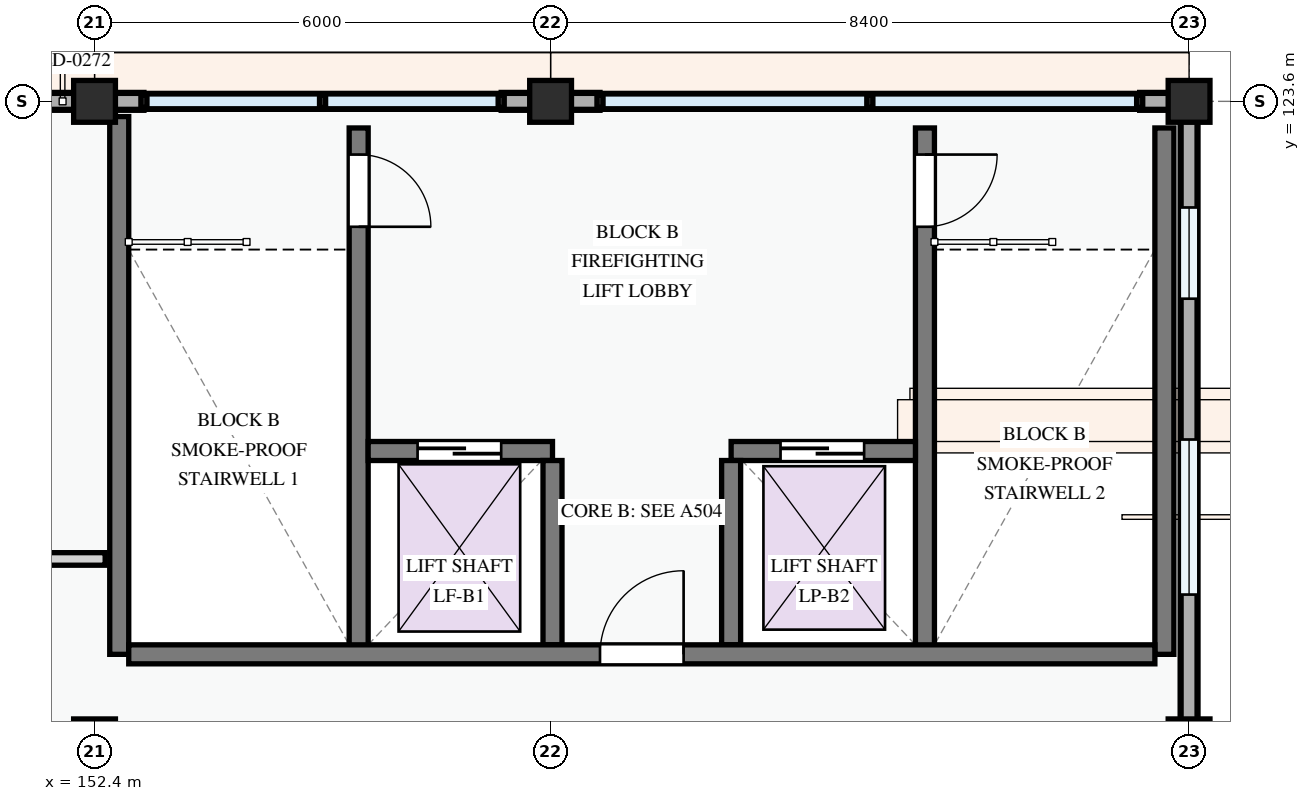
"""IFC4 building model, lengths in metres.
Left out: names, types, materials, properties, quantities, classifications, styles, units other than length and angle.
Written with IfcOpenShell. Run it as: python <this file> out.ifc"""

import sys

from ifc_helpers import new_model, si_unit, direction, frame, frame_2d, origin, origin_2d, place, context, subcontext, project, spatial, polyline, rectangle, outline, extrude, element, fill, save


model = new_model("IFC4")
c1 = context("Model", 3, precision=1e-05, world=origin(), true_north=direction((0.0, 1.0)))
c2 = subcontext(c1, "Body", "Model", "MODEL_VIEW")
j1 = project(units=[si_unit("LENGTHUNIT", "METRE"), si_unit("PLANEANGLEUNIT", "RADIAN")], contexts=[c1])
p1 = place(None, origin())
s1 = spatial("IfcSite", under=j1, at=p1, CompositionType="ELEMENT")
p2 = place(p1, origin())
s2 = spatial("IfcBuilding", under=s1, at=p2, CompositionType="ELEMENT")
p3 = place(p2, frame((0.0, 0.0, 41.1)))
s3 = spatial("IfcBuildingStorey", under=s2, at=p3, CompositionType="ELEMENT", Elevation=41.1)
for number, where, z_axis, x_axis in (
    (1, (152.4, 115.2, 0.0), (0.0, 0.0, 1.0), (1.0, 0.0, 0.0)),
    (2, (152.4, 123.6, 0.0), (0.0, 0.0, 1.0), (1.0, 0.0, 0.0)),
    (3, (158.4, 123.6, 0.0), (0.0, 0.0, 1.0), (1.0, 0.0, 0.0)),
    (4, (166.8, 115.2, 0.0), (0.0, 0.0, 1.0), (1.0, 0.0, 0.0)),
    (5, (166.8, 123.6, 0.0), (0.0, 0.0, 1.0), (1.0, 0.0, 0.0)),
):
    element("IfcColumn", number, at=place(p3, frame(where, z_axis=z_axis, x_axis=x_axis)), inside=s3, PredefinedType="COLUMN", context=c2, shape_type="SweptSolid", body=[
        extrude(rectangle(XDim=0.55, YDim=0.55, at=origin_2d()), origin(), (0.0, 0.0, 1.0), 3.3),
    ])
p4 = place(p3, frame((166.8, 115.2, 0.0), z_axis=(0.0, 0.0, 1.0), x_axis=(0.0, 1.0, 0.0)))
e6 = element("IfcWall", 6, at=p4, inside=s3, PredefinedType="STANDARD", context=c2, shape_type="SweptSolid", body=[
    extrude(rectangle(XDim=8.4, YDim=0.235, at=frame_2d((4.2, 0.0))), origin(), (0.0, 0.0, 1.0), 2.345),
])
p5 = place(p4, frame((1.911, 0.0, 0.78)))
e7 = element("IfcOpeningElement", 7, at=p5, cuts=e6, PredefinedType="OPENING", context=c2, shape_type="SweptSolid", body=[
    extrude(rectangle(XDim=2.04, YDim=1.46, at=frame_2d((1.02, 0.73))), frame((0.0, 0.127, 0.0), z_axis=(0.0, -1.0, 0.0), x_axis=(1.0, 0.0, 0.0)), (0.0, 0.0, 1.0), 0.255),
])
p6 = place(p4, frame((5.804, 0.0, 0.78)))
e8 = element("IfcOpeningElement", 8, at=p6, cuts=e6, PredefinedType="OPENING", context=c2, shape_type="SweptSolid", body=[
    extrude(rectangle(XDim=1.2, YDim=1.35, at=frame_2d((0.6, 0.675))), frame((0.0, 0.127, 0.0), z_axis=(0.0, -1.0, 0.0), x_axis=(1.0, 0.0, 0.0)), (0.0, 0.0, 1.0), 0.255),
])
p7 = place(p3, frame((166.68, 123.6, 0.0), z_axis=(0.0, 0.0, 1.0), x_axis=(-1.0, 0.0, 0.0)))
e9 = element("IfcWall", 9, at=p7, inside=s3, PredefinedType="STANDARD", context=c2, shape_type="SweptSolid", body=[
    extrude(rectangle(XDim=0.531, YDim=0.235, at=frame_2d((0.265, 0.0))), origin(), (0.0, 0.0, 1.0), 3.04),
])
p8 = place(p3, frame((159.05, 123.6, 0.0), z_axis=(0.0, 0.0, 1.0), x_axis=(-1.0, 0.0, 0.0)))
e10 = element("IfcWall", 10, at=p8, inside=s3, PredefinedType="STANDARD", context=c2, shape_type="SweptSolid", body=[
    extrude(rectangle(XDim=0.65, YDim=0.235, at=frame_2d((0.325, 0.0))), origin(), (0.0, 0.0, 1.0), 3.04),
])
p9 = place(p3, frame((158.4, 123.6, 0.0), z_axis=(0.0, 0.0, 1.0), x_axis=(-1.0, 0.0, 0.0)))
e11 = element("IfcWall", 11, at=p9, inside=s3, PredefinedType="STANDARD", context=c2, shape_type="SweptSolid", body=[
    extrude(rectangle(XDim=0.65, YDim=0.235, at=frame_2d((0.325, 0.0))), origin(), (0.0, 0.0, 1.0), 3.04),
])
p10 = place(p3, frame((153.05, 123.6, 0.0), z_axis=(0.0, 0.0, 1.0), x_axis=(-1.0, 0.0, 0.0)))
e12 = element("IfcWall", 12, at=p10, inside=s3, PredefinedType="STANDARD", context=c2, shape_type="SweptSolid", body=[
    extrude(rectangle(XDim=0.65, YDim=0.235, at=frame_2d((0.325, 0.0))), origin(), (0.0, 0.0, 1.0), 3.04),
])
p11 = place(p3, frame((152.4, 123.6, 0.0), z_axis=(0.0, 0.0, 1.0), x_axis=(-1.0, 0.0, 0.0)))
e13 = element("IfcWall", 13, at=p11, inside=s3, PredefinedType="STANDARD", context=c2, shape_type="SweptSolid", body=[
    extrude(rectangle(XDim=8.4, YDim=0.235, at=frame_2d((4.2, 0.0))), origin(), (0.0, 0.0, 1.0), 2.345),
])
p12 = place(p11, frame((0.62, 0.0, 0.0)))
e14 = element("IfcOpeningElement", 14, at=p12, cuts=e13, PredefinedType="OPENING", context=c2, shape_type="SweptSolid", body=[
    extrude(rectangle(XDim=1.3, YDim=2.15, at=frame_2d((0.65, 1.075))), frame((0.0, 0.127, 0.0), z_axis=(0.0, -1.0, 0.0), x_axis=(1.0, 0.0, 0.0)), (0.0, 0.0, 1.0), 0.255),
])
p13 = place(p11, frame((2.79, 0.0, 0.78)))
e15 = element("IfcOpeningElement", 15, at=p13, cuts=e13, PredefinedType="OPENING", context=c2, shape_type="SweptSolid", body=[
    extrude(rectangle(XDim=1.55, YDim=1.4, at=frame_2d((0.775, 0.7))), frame((0.0, 0.127, 0.0), z_axis=(0.0, -1.0, 0.0), x_axis=(1.0, 0.0, 0.0)), (0.0, 0.0, 1.0), 0.255),
])
p14 = place(p11, frame((5.955, 0.0, 0.78)))
e16 = element("IfcOpeningElement", 16, at=p14, cuts=e13, PredefinedType="OPENING", context=c2, shape_type="SweptSolid", body=[
    extrude(rectangle(XDim=1.32, YDim=1.35, at=frame_2d((0.66, 0.675))), frame((0.0, 0.127, 0.0), z_axis=(0.0, -1.0, 0.0), x_axis=(1.0, 0.0, 0.0)), (0.0, 0.0, 1.0), 0.255),
])
for number, where, z_axis, x_axis in (
    (17, (166.8, 115.2, 3.3), (0.0, 0.0, 1.0), (0.0, 1.0, 0.0)),
    (18, (166.8, 123.6, 3.3), (0.0, 0.0, 1.0), (-1.0, 0.0, 0.0)),
):
    element("IfcWall", number, at=place(p3, frame(where, z_axis=z_axis, x_axis=x_axis)), inside=s3, PredefinedType="PARAPET", context=c2, shape_type="SweptSolid", body=[
        extrude(outline(polyline([(0.0, 0.0), (8.4, 0.0), (8.4, 1.12), (7.7, 1.322), (7.0, 1.485), (6.3, 1.618), (5.6, 1.718), (4.9, 1.779), (4.2, 1.8), (3.5, 1.779), (2.8, 1.718), (2.1, 1.618), (1.4, 1.485), (0.7, 1.322), (0.0, 1.12), (0.0, 0.0)])), frame((0.0, 0.105, 0.0), z_axis=(0.0, -1.0, 0.0), x_axis=(1.0, 0.0, 0.0)), (0.0, 0.0, 1.0), 0.21),
    ])
p15 = place(p3, frame((158.4, 123.6, 3.3), z_axis=(0.0, 0.0, 1.0), x_axis=(-1.0, 0.0, 0.0)))
e19 = element("IfcWall", 19, at=p15, inside=s3, PredefinedType="PARAPET", context=c2, shape_type="SweptSolid", body=[
    extrude(outline(polyline([(0.0, 0.0), (6.0, 0.0), (6.0, 1.12), (5.5, 1.322), (5.0, 1.485), (4.5, 1.618), (4.0, 1.718), (3.5, 1.779), (3.0, 1.8), (2.5, 1.779), (2.0, 1.718), (1.5, 1.618), (1.0, 1.485), (0.5, 1.322), (0.0, 1.12), (0.0, 0.0)])), frame((0.0, 0.105, 0.0), z_axis=(0.0, -1.0, 0.0), x_axis=(1.0, 0.0, 0.0)), (0.0, 0.0, 1.0), 0.21),
])
p16 = place(p3, frame((152.4, 123.6, 3.3), z_axis=(0.0, 0.0, 1.0), x_axis=(-1.0, 0.0, 0.0)))
e20 = element("IfcWall", 20, at=p16, inside=s3, PredefinedType="PARAPET", context=c2, shape_type="SweptSolid", body=[
    extrude(outline(polyline([(0.0, 0.0), (8.4, 0.0), (8.4, 1.12), (7.7, 1.322), (7.0, 1.485), (6.3, 1.618), (5.6, 1.718), (4.9, 1.779), (4.2, 1.8), (3.5, 1.779), (2.8, 1.718), (2.1, 1.618), (1.4, 1.485), (0.7, 1.322), (0.0, 1.12), (0.0, 0.0)])), frame((0.0, 0.105, 0.0), z_axis=(0.0, -1.0, 0.0), x_axis=(1.0, 0.0, 0.0)), (0.0, 0.0, 1.0), 0.21),
])
p17 = place(p3, frame((155.875, 123.25, 0.0), z_axis=(0.0, 0.0, 1.0), x_axis=(0.0, -1.0, 0.0)))
e21 = element("IfcWall", 21, at=p17, inside=s3, PredefinedType="SHEAR", context=c2, shape_type="SweptSolid", body=[
    extrude(rectangle(XDim=6.925, YDim=0.25, at=frame_2d((3.462, 0.0))), origin(), (0.0, 0.0, 1.0), 3.0),
])
p18 = place(p17, frame((0.35, 0.0, 0.0)))
e22 = element("IfcOpeningElement", 22, at=p18, cuts=e21, PredefinedType="OPENING", context=c2, shape_type="SweptSolid", body=[
    extrude(rectangle(XDim=0.95, YDim=2.1, at=frame_2d((0.475, 1.05))), frame((0.0, 0.135, 0.0), z_axis=(0.0, -1.0, 0.0), x_axis=(1.0, 0.0, 0.0)), (0.0, 0.0, 1.0), 0.27),
])
p19 = place(p3, frame((152.725, 123.4, 0.0), z_axis=(0.0, 0.0, 1.0), x_axis=(0.0, -1.0, 0.0)))
e23 = element("IfcWall", 23, at=p19, inside=s3, PredefinedType="SHEAR", context=c2, shape_type="SweptSolid", body=[
    extrude(rectangle(XDim=7.075, YDim=0.25, at=frame_2d((3.538, 0.0))), origin(), (0.0, 0.0, 1.0), 3.0),
])
p20 = place(p3, frame((166.475, 123.25, 0.0), z_axis=(0.0, 0.0, 1.0), x_axis=(0.0, -1.0, 0.0)))
e24 = element("IfcWall", 24, at=p20, inside=s3, PredefinedType="SHEAR", context=c2, shape_type="SweptSolid", body=[
    extrude(rectangle(XDim=6.925, YDim=0.25, at=frame_2d((3.462, 0.0))), origin(), (0.0, 0.0, 1.0), 3.0),
])
p21 = place(p3, frame((163.325, 123.25, 0.0), z_axis=(0.0, 0.0, 1.0), x_axis=(0.0, -1.0, 0.0)))
e25 = element("IfcWall", 25, at=p21, inside=s3, PredefinedType="SHEAR", context=c2, shape_type="SweptSolid", body=[
    extrude(rectangle(XDim=6.925, YDim=0.25, at=frame_2d((3.462, 0.0))), origin(), (0.0, 0.0, 1.0), 3.0),
])
p22 = place(p21, frame((0.35, 0.0, 0.0)))
e26 = element("IfcOpeningElement", 26, at=p22, cuts=e25, PredefinedType="OPENING", context=c2, shape_type="SweptSolid", body=[
    extrude(rectangle(XDim=0.95, YDim=2.1, at=frame_2d((0.475, 1.05))), frame((0.0, 0.135, 0.0), z_axis=(0.0, -1.0, 0.0), x_axis=(1.0, 0.0, 0.0)), (0.0, 0.0, 1.0), 0.27),
])
p23 = place(p3, frame((156.0, 119.0, 0.0), z_axis=(0.0, 0.0, 1.0), x_axis=(1.0, 0.0, 0.0)))
e27 = element("IfcWall", 27, at=p23, inside=s3, PredefinedType="SHEAR", context=c2, shape_type="SweptSolid", body=[
    extrude(rectangle(XDim=2.425, YDim=0.25, at=frame_2d((1.212, 0.0))), origin(), (0.0, 0.0, 1.0), 3.0),
])
p24 = place(p23, frame((0.65, 0.0, 0.0)))
e28 = element("IfcOpeningElement", 28, at=p24, cuts=e27, PredefinedType="OPENING", context=c2, shape_type="SweptSolid", body=[
    extrude(rectangle(XDim=1.1, YDim=2.15, at=frame_2d((0.55, 1.075))), frame((0.0, 0.135, 0.0), z_axis=(0.0, -1.0, 0.0), x_axis=(1.0, 0.0, 0.0)), (0.0, 0.0, 1.0), 0.27),
])
p25 = place(p3, frame((160.775, 119.0, 0.0), z_axis=(0.0, 0.0, 1.0), x_axis=(1.0, 0.0, 0.0)))
e29 = element("IfcWall", 29, at=p25, inside=s3, PredefinedType="SHEAR", context=c2, shape_type="SweptSolid", body=[
    extrude(rectangle(XDim=2.425, YDim=0.25, at=frame_2d((1.212, 0.0))), origin(), (0.0, 0.0, 1.0), 3.0),
])
p26 = place(p25, frame((0.65, 0.0, 0.0)))
e30 = element("IfcOpeningElement", 30, at=p26, cuts=e29, PredefinedType="OPENING", context=c2, shape_type="SweptSolid", body=[
    extrude(rectangle(XDim=1.1, YDim=2.15, at=frame_2d((0.55, 1.075))), frame((0.0, 0.135, 0.0), z_axis=(0.0, -1.0, 0.0), x_axis=(1.0, 0.0, 0.0)), (0.0, 0.0, 1.0), 0.27),
])
for number, where, z_axis, x_axis in (
    (31, (158.425, 118.875, 0.0), (0.0, 0.0, 1.0), (0.0, -1.0, 0.0)),
    (32, (160.775, 118.875, 0.0), (0.0, 0.0, 1.0), (0.0, -1.0, 0.0)),
):
    element("IfcWall", number, at=place(p3, frame(where, z_axis=z_axis, x_axis=x_axis)), inside=s3, PredefinedType="SHEAR", context=c2, shape_type="SweptSolid", body=[
        extrude(rectangle(XDim=2.425, YDim=0.25, at=frame_2d((1.212, 0.0))), origin(), (0.0, 0.0, 1.0), 3.0),
    ])
p27 = place(p3, frame((152.85, 116.325, 0.0), z_axis=(0.0, 0.0, 1.0), x_axis=(1.0, 0.0, 0.0)))
e33 = element("IfcWall", 33, at=p27, inside=s3, PredefinedType="SHEAR", context=c2, shape_type="SweptSolid", body=[
    extrude(rectangle(XDim=13.5, YDim=0.25, at=frame_2d((6.75, 0.0))), origin(), (0.0, 0.0, 1.0), 3.0),
])
p28 = place(p27, frame((6.2, 0.0, 0.0)))
e34 = element("IfcOpeningElement", 34, at=p28, cuts=e33, PredefinedType="OPENING", context=c2, shape_type="SweptSolid", body=[
    extrude(rectangle(XDim=1.1, YDim=2.15, at=frame_2d((0.55, 1.075))), frame((0.0, 0.135, 0.0), z_axis=(0.0, -1.0, 0.0), x_axis=(1.0, 0.0, 0.0)), (0.0, 0.0, 1.0), 0.27),
])
p29 = place(p3, frame((109.32, 117.58, 0.0), z_axis=(0.0, 0.0, 1.0), x_axis=(1.0, 0.0, 0.0)))
e35 = element("IfcWall", 35, at=p29, inside=s3, PredefinedType="PARTITIONING", context=c2, shape_type="SweptSolid", body=[
    extrude(rectangle(XDim=43.22, YDim=0.165, at=frame_2d((21.61, 0.0))), origin(), (0.0, 0.0, 1.0), 3.0),
])
p30 = place(p29, frame((2.344, 0.0, 0.0)))
e36 = element("IfcOpeningElement", 36, at=p30, cuts=e35, PredefinedType="OPENING", context=c2, shape_type="SweptSolid", body=[
    extrude(rectangle(XDim=0.92, YDim=2.1, at=frame_2d((0.46, 1.05))), frame((0.0, 0.093, 0.0), z_axis=(0.0, -1.0, 0.0), x_axis=(1.0, 0.0, 0.0)), (0.0, 0.0, 1.0), 0.185),
])
p31 = place(p29, frame((16.856, 0.0, 0.0)))
e37 = element("IfcOpeningElement", 37, at=p31, cuts=e35, PredefinedType="OPENING", context=c2, shape_type="SweptSolid", body=[
    extrude(rectangle(XDim=0.92, YDim=2.1, at=frame_2d((0.46, 1.05))), frame((0.0, 0.093, 0.0), z_axis=(0.0, -1.0, 0.0), x_axis=(1.0, 0.0, 0.0)), (0.0, 0.0, 1.0), 0.185),
])
p32 = place(p29, frame((31.227, 0.0, 0.0)))
e38 = element("IfcOpeningElement", 38, at=p32, cuts=e35, PredefinedType="OPENING", context=c2, shape_type="SweptSolid", body=[
    extrude(rectangle(XDim=0.92, YDim=2.1, at=frame_2d((0.46, 1.05))), frame((0.0, 0.093, 0.0), z_axis=(0.0, -1.0, 0.0), x_axis=(1.0, 0.0, 0.0)), (0.0, 0.0, 1.0), 0.185),
])
p33 = place(p5, origin())
e39 = element("IfcWindow", 39, at=p33, inside=s3, PartitioningType="DOUBLE_PANEL_VERTICAL", PredefinedType="WINDOW", context=c2, shape_type="SweptSolid", body=[
    extrude(rectangle(XDim=2.04, YDim=1.46, at=frame_2d((1.02, 0.73))), frame((0.0, 0.03, 0.0), z_axis=(0.0, -1.0, 0.0), x_axis=(1.0, 0.0, 0.0)), (0.0, 0.0, 1.0), 0.06),
])
fill(e7, e39)
p34 = place(p6, origin())
e40 = element("IfcWindow", 40, at=p34, inside=s3, PartitioningType="SINGLE_PANEL", PredefinedType="WINDOW", context=c2, shape_type="SweptSolid", body=[
    extrude(rectangle(XDim=1.2, YDim=1.35, at=frame_2d((0.6, 0.675))), frame((0.0, 0.03, 0.0), z_axis=(0.0, -1.0, 0.0), x_axis=(1.0, 0.0, 0.0)), (0.0, 0.0, 1.0), 0.06),
])
fill(e8, e40)
p35 = place(p18, origin())
e41 = element("IfcDoor", 41, at=p35, inside=s3, OperationType="SINGLE_SWING_RIGHT", PredefinedType="DOOR", context=c2, shape_type="SweptSolid", body=[
    extrude(rectangle(XDim=0.95, YDim=2.1, at=frame_2d((0.475, 1.05))), frame((0.0, 0.025, 0.0), z_axis=(0.0, -1.0, 0.0), x_axis=(1.0, 0.0, 0.0)), (0.0, 0.0, 1.0), 0.05),
])
fill(e22, e41)
p36 = place(p22, origin())
e42 = element("IfcDoor", 42, at=p36, inside=s3, OperationType="SINGLE_SWING_LEFT", PredefinedType="DOOR", context=c2, shape_type="SweptSolid", body=[
    extrude(rectangle(XDim=0.95, YDim=2.1, at=frame_2d((0.475, 1.05))), frame((0.0, 0.025, 0.0), z_axis=(0.0, -1.0, 0.0), x_axis=(1.0, 0.0, 0.0)), (0.0, 0.0, 1.0), 0.05),
])
fill(e26, e42)
p37 = place(p24, origin())
e43 = element("IfcDoor", 43, at=p37, inside=s3, OperationType="SLIDING_TO_LEFT", PredefinedType="DOOR", context=c2, shape_type="SweptSolid", body=[
    extrude(rectangle(XDim=1.1, YDim=2.15, at=frame_2d((0.55, 1.075))), frame((0.0, 0.025, 0.0), z_axis=(0.0, -1.0, 0.0), x_axis=(1.0, 0.0, 0.0)), (0.0, 0.0, 1.0), 0.05),
])
fill(e28, e43)
p38 = place(p26, origin())
e44 = element("IfcDoor", 44, at=p38, inside=s3, OperationType="SLIDING_TO_LEFT", PredefinedType="DOOR", context=c2, shape_type="SweptSolid", body=[
    extrude(rectangle(XDim=1.1, YDim=2.15, at=frame_2d((0.55, 1.075))), frame((0.0, 0.025, 0.0), z_axis=(0.0, -1.0, 0.0), x_axis=(1.0, 0.0, 0.0)), (0.0, 0.0, 1.0), 0.05),
])
fill(e30, e44)
p39 = place(p28, origin())
e45 = element("IfcDoor", 45, at=p39, inside=s3, OperationType="SINGLE_SWING_RIGHT", PredefinedType="DOOR", context=c2, shape_type="SweptSolid", body=[
    extrude(rectangle(XDim=1.1, YDim=2.15, at=frame_2d((0.55, 1.075))), frame((0.0, 0.025, 0.0), z_axis=(0.0, -1.0, 0.0), x_axis=(1.0, 0.0, 0.0)), (0.0, 0.0, 1.0), 0.05),
])
fill(e34, e45)
save(model, sys.argv[1])
